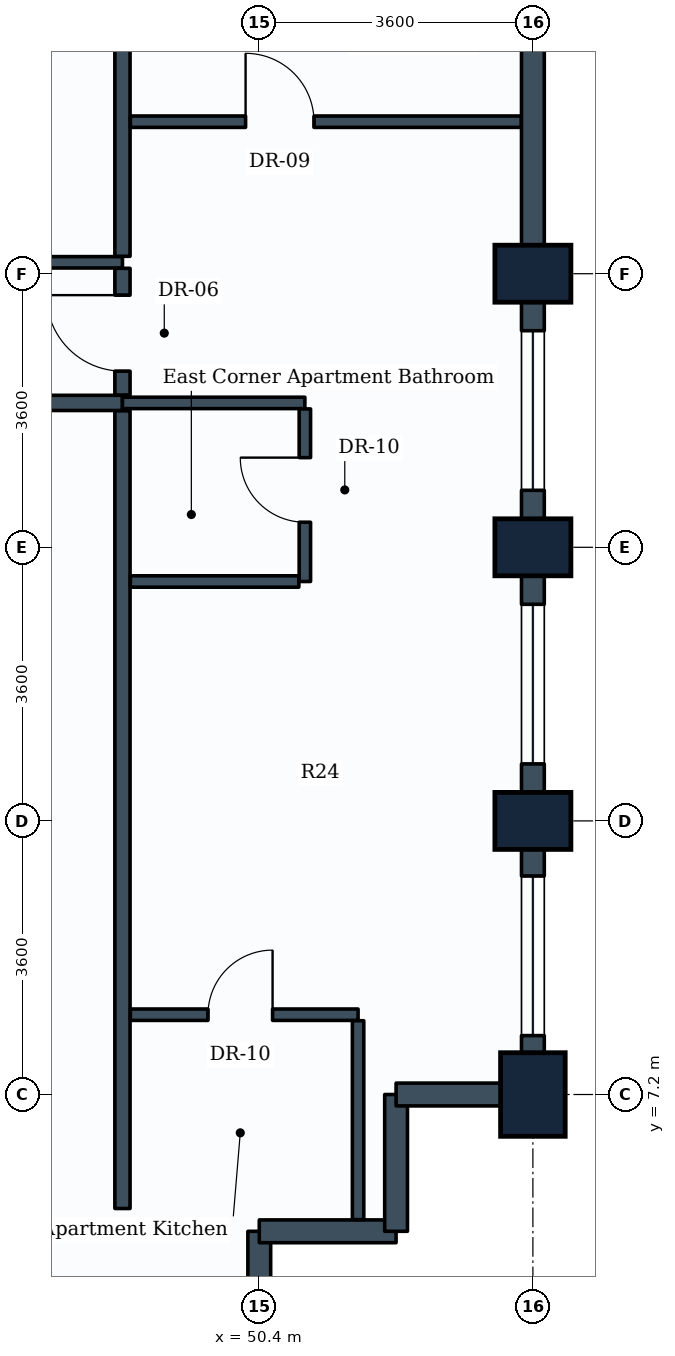
"""IFC4 building model, lengths in metres.
Left out: names, types, materials, properties, quantities, classifications, styles, units other than length and angle.
Written with IfcOpenShell. Run it as: python <this file> out.ifc"""

import sys

from ifc_helpers import new_model, si_unit, direction, frame, frame_2d, origin, origin_2d, place, context, subcontext, project, spatial, rectangle, extrude, element, fill, save


model = new_model("IFC4")
c1 = context("Model", 3, precision=1e-05, world=origin(), true_north=direction((0.0, 1.0)))
c2 = subcontext(c1, "Body", "Model", "MODEL_VIEW")
j1 = project(units=[si_unit("LENGTHUNIT", "METRE"), si_unit("PLANEANGLEUNIT", "RADIAN")], contexts=[c1])
p1 = place(None, origin())
s1 = spatial("IfcSite", under=j1, at=p1, CompositionType="ELEMENT")
p2 = place(p1, origin())
s2 = spatial("IfcBuilding", under=s1, at=p2, CompositionType="ELEMENT")
p3 = place(p2, frame((0.0, 0.0, 139.0)))
s3 = spatial("IfcBuildingStorey", under=s2, at=p3, CompositionType="ELEMENT", Elevation=139.0)
p4 = place(p3, frame((54.0, 7.2, 0.0), z_axis=(0.0, 0.0, 1.0), x_axis=(1.0, 0.0, 0.0)))
e1 = element("IfcColumn", 1, at=p4, inside=s3, PredefinedType="COLUMN", context=c2, shape_type="SweptSolid", body=[
    extrude(rectangle(XDim=0.85, YDim=1.1, at=origin_2d()), origin(), (0.0, 0.0, 1.0), 3.8),
])
for number, where, z_axis, x_axis in (
    (2, (54.0, 10.8, 0.0), (0.0, 0.0, 1.0), (0.0, 1.0, 0.0)),
    (3, (54.0, 14.4, 0.0), (0.0, 0.0, 1.0), (0.0, 1.0, 0.0)),
    (4, (54.0, 18.0, 0.0), (0.0, 0.0, 1.0), (0.0, 1.0, 0.0)),
):
    element("IfcColumn", number, at=place(p3, frame(where, z_axis=z_axis, x_axis=x_axis)), inside=s3, PredefinedType="COLUMN", context=c2, shape_type="SweptSolid", body=[
        extrude(rectangle(XDim=0.75, YDim=1.0, at=origin_2d()), origin(), (0.0, 0.0, 1.0), 3.8),
    ])
p5 = place(p3, frame((50.4, 5.4, 0.0), z_axis=(0.0, 0.0, 1.0), x_axis=(0.0, -1.0, 0.0)))
e5 = element("IfcWall", 5, at=p5, inside=s3, PredefinedType="STANDARD", context=c2, shape_type="SweptSolid", body=[
    extrude(rectangle(XDim=1.8, YDim=0.3, at=frame_2d((0.9, 0.0))), origin(), (0.0, 0.0, 1.0), 2.93),
])
for number, where, z_axis, x_axis in (
    (6, (52.2, 5.4, 0.0), (0.0, 0.0, 1.0), (-1.0, 0.0, 0.0)),
    (7, (52.2, 7.2, 0.0), (0.0, 0.0, 1.0), (0.0, -1.0, 0.0)),
):
    element("IfcWall", number, at=place(p3, frame(where, z_axis=z_axis, x_axis=x_axis)), inside=s3, PredefinedType="STANDARD", context=c2, shape_type="SweptSolid", body=[
        extrude(rectangle(XDim=1.8, YDim=0.3, at=frame_2d((0.9, 0.0))), origin(), (0.0, 0.0, 1.0), 3.535),
    ])
p6 = place(p3, frame((54.0, 7.2, 0.0), z_axis=(0.0, 0.0, 1.0), x_axis=(-1.0, 0.0, 0.0)))
e8 = element("IfcWall", 8, at=p6, inside=s3, PredefinedType="STANDARD", context=c2, shape_type="SweptSolid", body=[
    extrude(rectangle(XDim=1.8, YDim=0.3, at=frame_2d((0.9, 0.0))), origin(), (0.0, 0.0, 1.0), 2.93),
])
p7 = place(p3, frame((54.0, 10.8, 0.0), z_axis=(0.0, 0.0, 1.0), x_axis=(0.0, -1.0, 0.0)))
e9 = element("IfcWall", 9, at=p7, inside=s3, PredefinedType="STANDARD", context=c2, shape_type="SweptSolid", body=[
    extrude(rectangle(XDim=3.6, YDim=0.3, at=frame_2d((1.8, 0.0))), origin(), (0.0, 0.0, 1.0), 2.93),
])
p8 = place(p7, frame((0.725, 0.0, 0.85)))
e10 = element("IfcOpeningElement", 10, at=p8, cuts=e9, PredefinedType="OPENING", context=c2, shape_type="SweptSolid", body=[
    extrude(rectangle(XDim=2.1, YDim=1.35, at=frame_2d((1.05, 0.675))), frame((0.0, 0.16, 0.0), z_axis=(0.0, -1.0, 0.0), x_axis=(1.0, 0.0, 0.0)), (0.0, 0.0, 1.0), 0.32),
])
p9 = place(p3, frame((54.0, 14.4, 0.0), z_axis=(0.0, 0.0, 1.0), x_axis=(0.0, -1.0, 0.0)))
e11 = element("IfcWall", 11, at=p9, inside=s3, PredefinedType="STANDARD", context=c2, shape_type="SweptSolid", body=[
    extrude(rectangle(XDim=3.6, YDim=0.3, at=frame_2d((1.8, 0.0))), origin(), (0.0, 0.0, 1.0), 2.93),
])
p10 = place(p9, frame((0.75, 0.0, 0.85)))
e12 = element("IfcOpeningElement", 12, at=p10, cuts=e11, PredefinedType="OPENING", context=c2, shape_type="SweptSolid", body=[
    extrude(rectangle(XDim=2.1, YDim=1.35, at=frame_2d((1.05, 0.675))), frame((0.0, 0.16, 0.0), z_axis=(0.0, -1.0, 0.0), x_axis=(1.0, 0.0, 0.0)), (0.0, 0.0, 1.0), 0.32),
])
p11 = place(p3, frame((54.0, 18.0, 0.0), z_axis=(0.0, 0.0, 1.0), x_axis=(0.0, -1.0, 0.0)))
e13 = element("IfcWall", 13, at=p11, inside=s3, PredefinedType="STANDARD", context=c2, shape_type="SweptSolid", body=[
    extrude(rectangle(XDim=3.6, YDim=0.3, at=frame_2d((1.8, 0.0))), origin(), (0.0, 0.0, 1.0), 2.93),
])
p12 = place(p11, frame((0.75, 0.0, 0.85)))
e14 = element("IfcOpeningElement", 14, at=p12, cuts=e13, PredefinedType="OPENING", context=c2, shape_type="SweptSolid", body=[
    extrude(rectangle(XDim=2.1, YDim=1.35, at=frame_2d((1.05, 0.675))), frame((0.0, 0.16, 0.0), z_axis=(0.0, -1.0, 0.0), x_axis=(1.0, 0.0, 0.0)), (0.0, 0.0, 1.0), 0.32),
])
p13 = place(p3, frame((54.0, 21.6, 0.0), z_axis=(0.0, 0.0, 1.0), x_axis=(0.0, -1.0, 0.0)))
e15 = element("IfcWall", 15, at=p13, inside=s3, PredefinedType="STANDARD", context=c2, shape_type="SweptSolid", body=[
    extrude(rectangle(XDim=3.6, YDim=0.3, at=frame_2d((1.8, 0.0))), origin(), (0.0, 0.0, 1.0), 2.93),
])
p14 = place(p3, frame((45.68, 16.3, 0.0), z_axis=(0.0, 0.0, 1.0), x_axis=(1.0, 0.0, 0.0)))
e16 = element("IfcWall", 16, at=p14, inside=s3, PredefinedType="PARTITIONING", context=c2, shape_type="SweptSolid", body=[
    extrude(rectangle(XDim=2.92, YDim=0.2, at=frame_2d((1.46, 0.0))), origin(), (0.0, 0.0, 1.0), 3.17),
])
p15 = place(p3, frame((43.904, 18.15, 0.0), z_axis=(0.0, 0.0, 1.0), x_axis=(1.0, 0.0, 0.0)))
e17 = element("IfcWall", 17, at=p15, inside=s3, PredefinedType="PARTITIONING", context=c2, shape_type="SweptSolid", body=[
    extrude(rectangle(XDim=4.696, YDim=0.15, at=frame_2d((2.348, 0.0))), origin(), (0.0, 0.0, 1.0), 3.17),
])
p16 = place(p15, frame((1.757, 0.0, 0.0)))
e18 = element("IfcOpeningElement", 18, at=p16, cuts=e17, PredefinedType="OPENING", context=c2, shape_type="SweptSolid", body=[
    extrude(rectangle(XDim=1.0, YDim=2.1, at=frame_2d((0.5, 1.05))), frame((0.0, 0.085, 0.0), z_axis=(0.0, -1.0, 0.0), x_axis=(1.0, 0.0, 0.0)), (0.0, 0.0, 1.0), 0.17),
])
p17 = place(p3, frame((48.6, 5.7, 0.0), z_axis=(0.0, 0.0, 1.0), x_axis=(0.0, 1.0, 0.0)))
e19 = element("IfcWall", 19, at=p17, inside=s3, PredefinedType="PARTITIONING", context=c2, shape_type="SweptSolid", body=[
    extrude(rectangle(XDim=10.496, YDim=0.2, at=frame_2d((5.248, 0.0))), origin(), (0.0, 0.0, 1.0), 3.17),
])
p18 = place(p3, frame((48.6, 18.229, 0.0), z_axis=(0.0, 0.0, 1.0), x_axis=(0.0, 1.0, 0.0)))
e20 = element("IfcWall", 20, at=p18, inside=s3, PredefinedType="PARTITIONING", context=c2, shape_type="SweptSolid", body=[
    extrude(rectangle(XDim=6.817, YDim=0.2, at=frame_2d((3.408, 0.0))), origin(), (0.0, 0.0, 1.0), 2.93),
])
p19 = place(p3, frame((48.6, 16.404, 0.0), z_axis=(0.0, 0.0, 1.0), x_axis=(0.0, 1.0, 0.0)))
e21 = element("IfcWall", 21, at=p19, inside=s3, PredefinedType="PARTITIONING", context=c2, shape_type="SweptSolid", body=[
    extrude(rectangle(XDim=1.667, YDim=0.2, at=frame_2d((0.833, 0.0))), origin(), (0.0, 0.0, 1.0), 3.535),
])
p20 = place(p19, frame((0.314, 0.0, 0.0)))
e22 = element("IfcOpeningElement", 22, at=p20, cuts=e21, PredefinedType="OPENING", context=c2, shape_type="SweptSolid", body=[
    extrude(rectangle(XDim=1.0, YDim=2.1, at=frame_2d((0.5, 1.05))), frame((0.0, 0.11, 0.0), z_axis=(0.0, -1.0, 0.0), x_axis=(1.0, 0.0, 0.0)), (0.0, 0.0, 1.0), 0.22),
])
p21 = place(p3, frame((48.6, 16.3, 0.0), z_axis=(0.0, 0.0, 1.0), x_axis=(1.0, 0.0, 0.0)))
e23 = element("IfcWall", 23, at=p21, inside=s3, PredefinedType="PARTITIONING", context=c2, shape_type="SweptSolid", body=[
    extrude(rectangle(XDim=2.4, YDim=0.15, at=frame_2d((1.2, 0.0))), origin(), (0.0, 0.0, 1.0), 3.535),
])
p22 = place(p3, frame((51.0, 13.95, 0.0), z_axis=(0.0, 0.0, 1.0), x_axis=(0.0, 1.0, 0.0)))
e24 = element("IfcWall", 24, at=p22, inside=s3, PredefinedType="PARTITIONING", context=c2, shape_type="SweptSolid", body=[
    extrude(rectangle(XDim=2.271, YDim=0.15, at=frame_2d((1.135, 0.0))), origin(), (0.0, 0.0, 1.0), 3.17),
])
p23 = place(p22, frame((0.78, 0.0, 0.0)))
e25 = element("IfcOpeningElement", 25, at=p23, cuts=e24, PredefinedType="OPENING", context=c2, shape_type="SweptSolid", body=[
    extrude(rectangle(XDim=0.85, YDim=2.1, at=frame_2d((0.425, 1.05))), frame((0.0, 0.085, 0.0), z_axis=(0.0, -1.0, 0.0), x_axis=(1.0, 0.0, 0.0)), (0.0, 0.0, 1.0), 0.17),
])
p24 = place(p3, frame((48.704, 13.95, 0.0), z_axis=(0.0, 0.0, 1.0), x_axis=(1.0, 0.0, 0.0)))
e26 = element("IfcWall", 26, at=p24, inside=s3, PredefinedType="PARTITIONING", context=c2, shape_type="SweptSolid", body=[
    extrude(rectangle(XDim=2.217, YDim=0.15, at=frame_2d((1.108, 0.0))), origin(), (0.0, 0.0, 1.0), 3.535),
])
p25 = place(p3, frame((48.704, 20.0, 0.0), z_axis=(0.0, 0.0, 1.0), x_axis=(1.0, 0.0, 0.0)))
e27 = element("IfcWall", 27, at=p25, inside=s3, PredefinedType="PARTITIONING", context=c2, shape_type="SweptSolid", body=[
    extrude(rectangle(XDim=5.142, YDim=0.15, at=frame_2d((2.571, 0.0))), origin(), (0.0, 0.0, 1.0), 2.93),
])
p26 = place(p25, frame((1.516, 0.0, 0.0)))
e28 = element("IfcOpeningElement", 28, at=p26, cuts=e27, PredefinedType="OPENING", context=c2, shape_type="SweptSolid", body=[
    extrude(rectangle(XDim=0.9, YDim=2.1, at=frame_2d((0.45, 1.05))), frame((0.0, 0.085, 0.0), z_axis=(0.0, -1.0, 0.0), x_axis=(1.0, 0.0, 0.0)), (0.0, 0.0, 1.0), 0.17),
])
p27 = place(p3, frame((48.704, 8.25, 0.0), z_axis=(0.0, 0.0, 1.0), x_axis=(1.0, 0.0, 0.0)))
e29 = element("IfcWall", 29, at=p27, inside=s3, PredefinedType="PARTITIONING", context=c2, shape_type="SweptSolid", body=[
    extrude(rectangle(XDim=2.996, YDim=0.15, at=frame_2d((1.498, 0.0))), origin(), (0.0, 0.0, 1.0), 3.535),
])
p28 = place(p27, frame((1.021, 0.0, 0.0)))
e30 = element("IfcOpeningElement", 30, at=p28, cuts=e29, PredefinedType="OPENING", context=c2, shape_type="SweptSolid", body=[
    extrude(rectangle(XDim=0.85, YDim=2.1, at=frame_2d((0.425, 1.05))), frame((0.0, 0.085, 0.0), z_axis=(0.0, -1.0, 0.0), x_axis=(1.0, 0.0, 0.0)), (0.0, 0.0, 1.0), 0.17),
])
p29 = place(p3, frame((51.7, 5.554, 0.0), z_axis=(0.0, 0.0, 1.0), x_axis=(0.0, 1.0, 0.0)))
e31 = element("IfcWall", 31, at=p29, inside=s3, PredefinedType="PARTITIONING", context=c2, shape_type="SweptSolid", body=[
    extrude(rectangle(XDim=2.617, YDim=0.15, at=frame_2d((1.309, 0.0))), origin(), (0.0, 0.0, 1.0), 3.535),
])
p30 = place(p8, origin())
e32 = element("IfcWindow", 32, at=p30, inside=s3, PartitioningType="SINGLE_PANEL", PredefinedType="WINDOW", context=c2, shape_type="SweptSolid", body=[
    extrude(rectangle(XDim=2.1, YDim=1.35, at=frame_2d((1.05, 0.675))), frame((0.0, 0.03, 0.0), z_axis=(0.0, -1.0, 0.0), x_axis=(1.0, 0.0, 0.0)), (0.0, 0.0, 1.0), 0.06),
])
fill(e10, e32)
p31 = place(p10, origin())
e33 = element("IfcWindow", 33, at=p31, inside=s3, PartitioningType="SINGLE_PANEL", PredefinedType="WINDOW", context=c2, shape_type="SweptSolid", body=[
    extrude(rectangle(XDim=2.1, YDim=1.35, at=frame_2d((1.05, 0.675))), frame((0.0, 0.03, 0.0), z_axis=(0.0, -1.0, 0.0), x_axis=(1.0, 0.0, 0.0)), (0.0, 0.0, 1.0), 0.06),
])
fill(e12, e33)
p32 = place(p12, origin())
e34 = element("IfcWindow", 34, at=p32, inside=s3, PartitioningType="SINGLE_PANEL", PredefinedType="WINDOW", context=c2, shape_type="SweptSolid", body=[
    extrude(rectangle(XDim=2.1, YDim=1.35, at=frame_2d((1.05, 0.675))), frame((0.0, 0.03, 0.0), z_axis=(0.0, -1.0, 0.0), x_axis=(1.0, 0.0, 0.0)), (0.0, 0.0, 1.0), 0.06),
])
fill(e14, e34)
p33 = place(p20, origin())
e35 = element("IfcDoor", 35, at=p33, inside=s3, OperationType="SINGLE_SWING_RIGHT", PredefinedType="DOOR", context=c2, shape_type="SweptSolid", body=[
    extrude(rectangle(XDim=1.0, YDim=2.1, at=frame_2d((0.5, 1.05))), frame((0.0, 0.025, 0.0), z_axis=(0.0, -1.0, 0.0), x_axis=(1.0, 0.0, 0.0)), (0.0, 0.0, 1.0), 0.05),
])
fill(e22, e35)
p34 = place(p23, origin())
e36 = element("IfcDoor", 36, at=p34, inside=s3, OperationType="SINGLE_SWING_RIGHT", PredefinedType="DOOR", context=c2, shape_type="SweptSolid", body=[
    extrude(rectangle(XDim=0.85, YDim=2.1, at=frame_2d((0.425, 1.05))), frame((0.0, 0.025, 0.0), z_axis=(0.0, -1.0, 0.0), x_axis=(1.0, 0.0, 0.0)), (0.0, 0.0, 1.0), 0.05),
])
fill(e25, e36)
p35 = place(p26, origin())
e37 = element("IfcDoor", 37, at=p35, inside=s3, OperationType="SINGLE_SWING_LEFT", PredefinedType="DOOR", context=c2, shape_type="SweptSolid", body=[
    extrude(rectangle(XDim=0.9, YDim=2.1, at=frame_2d((0.45, 1.05))), frame((0.0, 0.025, 0.0), z_axis=(0.0, -1.0, 0.0), x_axis=(1.0, 0.0, 0.0)), (0.0, 0.0, 1.0), 0.05),
])
fill(e28, e37)
p36 = place(p28, origin())
e38 = element("IfcDoor", 38, at=p36, inside=s3, OperationType="SINGLE_SWING_RIGHT", PredefinedType="DOOR", context=c2, shape_type="SweptSolid", body=[
    extrude(rectangle(XDim=0.85, YDim=2.1, at=frame_2d((0.425, 1.05))), frame((0.0, 0.025, 0.0), z_axis=(0.0, -1.0, 0.0), x_axis=(1.0, 0.0, 0.0)), (0.0, 0.0, 1.0), 0.05),
])
fill(e30, e38)
save(model, sys.argv[1])
